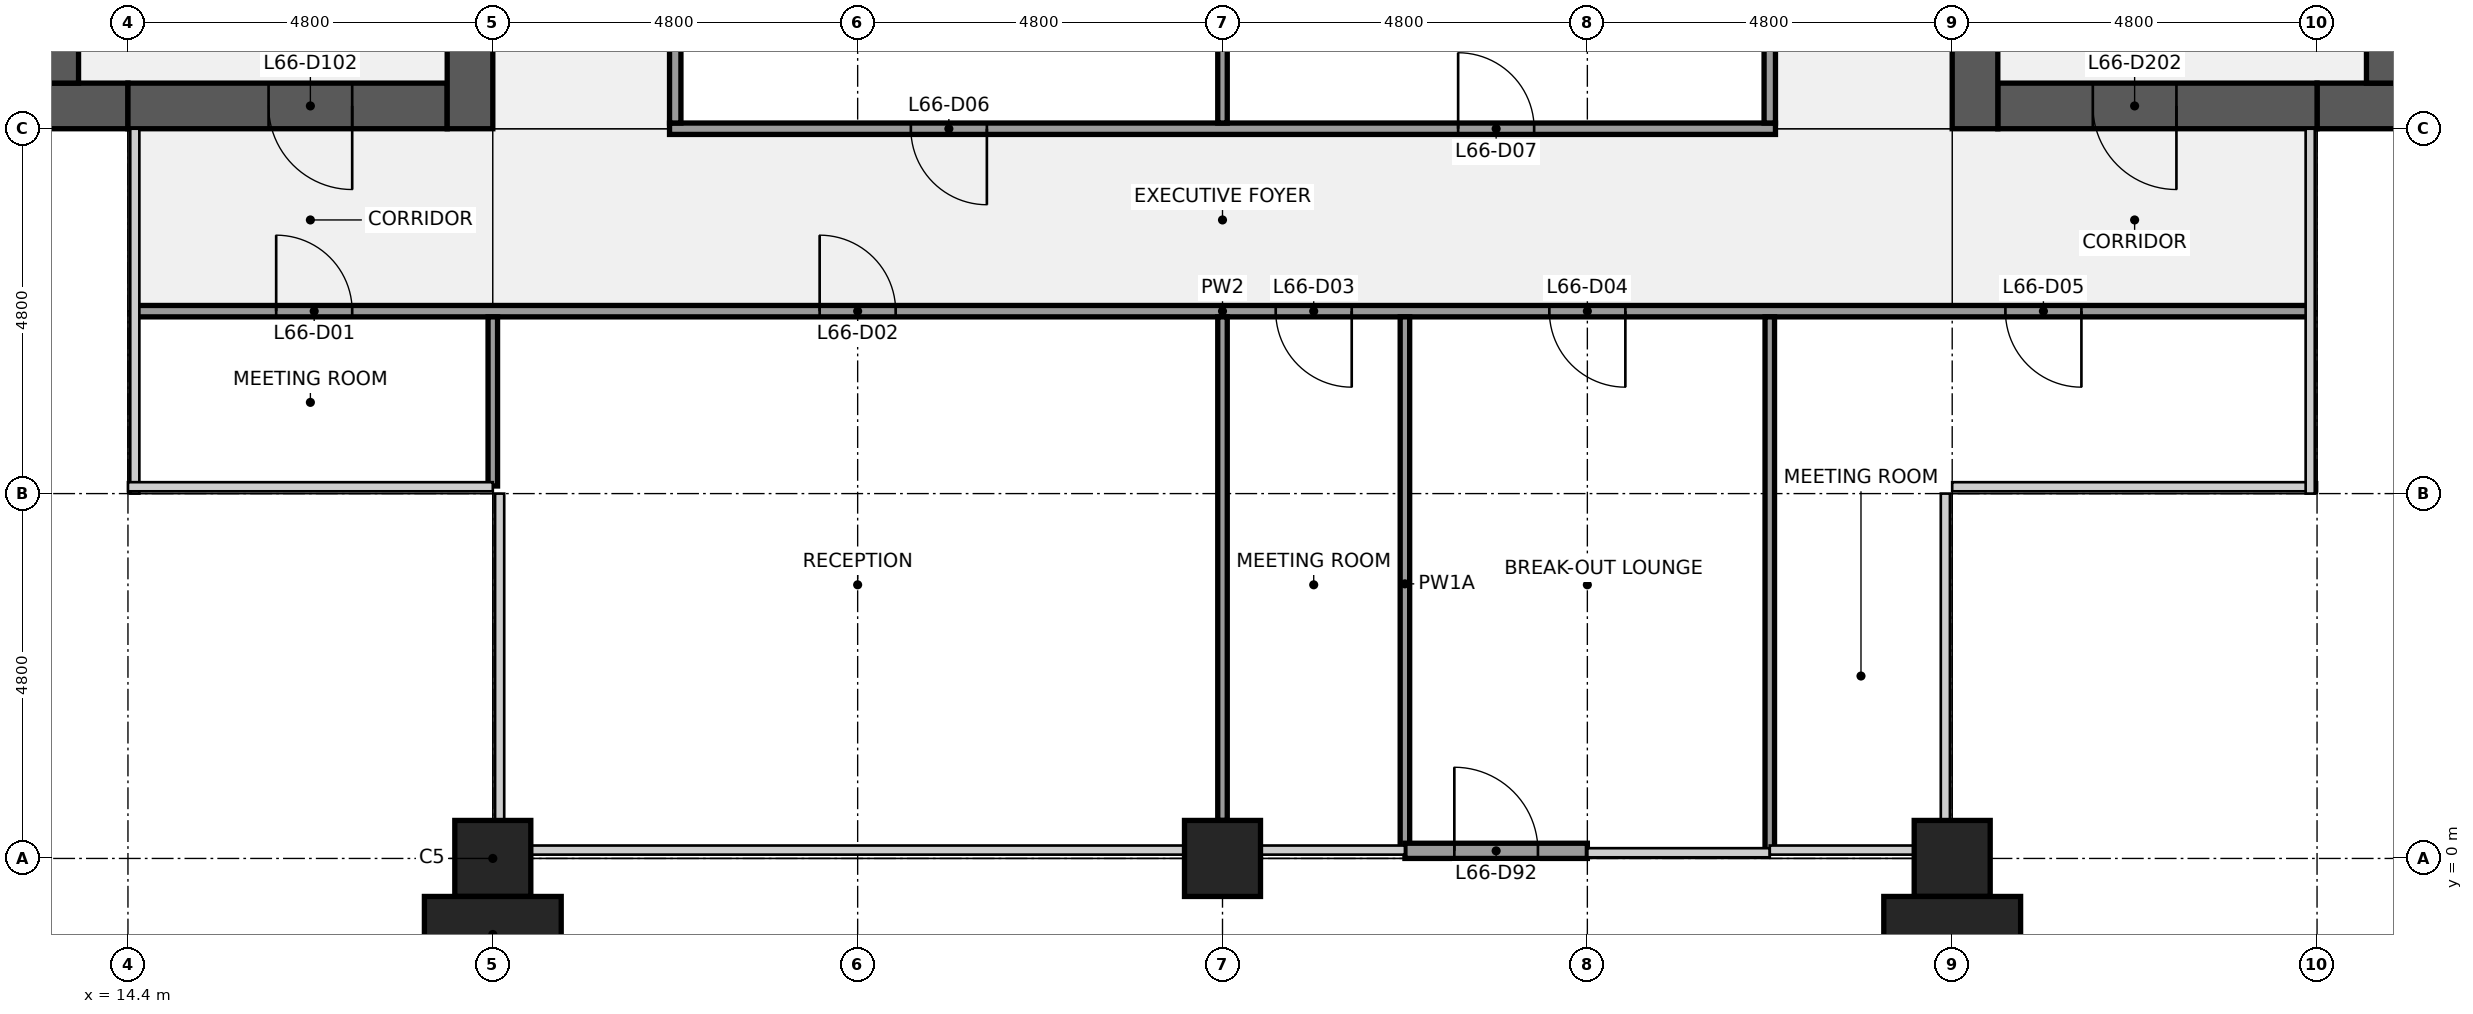
"""IFC4 building model, lengths in metres.
Left out: names, types, materials, properties, quantities, classifications, styles, units other than length and angle.
Written with IfcOpenShell. Run it as: python <this file> out.ifc"""

import sys

from ifc_helpers import new_model, si_unit, direction, frame, frame_2d, origin, origin_2d, place, context, subcontext, project, spatial, rectangle, extrude, element, fill, save


model = new_model("IFC4")
c1 = context("Model", 3, precision=1e-05, world=origin(), true_north=direction((0.0, 1.0)))
c2 = subcontext(c1, "Body", "Model", "MODEL_VIEW")
j1 = project(units=[si_unit("LENGTHUNIT", "METRE"), si_unit("PLANEANGLEUNIT", "RADIAN")], contexts=[c1])
p1 = place(None, origin())
s1 = spatial("IfcSite", under=j1, at=p1, CompositionType="ELEMENT")
p2 = place(p1, origin())
s2 = spatial("IfcBuilding", under=s1, at=p2, CompositionType="ELEMENT")
p3 = place(p2, frame((0.0, 0.0, 302.3)))
s3 = spatial("IfcBuildingStorey", under=s2, at=p3, CompositionType="ELEMENT", Elevation=302.3)
for number, where, z_axis, x_axis in (
    (1, (19.2, 0.0, 0.0), (0.0, 0.0, 1.0), (1.0, 0.0, 0.0)),
    (2, (28.8, 0.0, 0.0), (0.0, 0.0, 1.0), (1.0, 0.0, 0.0)),
    (3, (38.4, 0.0, 0.0), (0.0, 0.0, 1.0), (1.0, 0.0, 0.0)),
):
    element("IfcColumn", number, at=place(p3, frame(where, z_axis=z_axis, x_axis=x_axis)), inside=s3, PredefinedType="COLUMN", context=c2, shape_type="SweptSolid", body=[
        extrude(rectangle(XDim=1.0, YDim=1.0, at=origin_2d()), origin(), (0.0, 0.0, 1.0), 4.0),
    ])
p4 = place(p3, frame((14.4, 9.9, 0.0), z_axis=(0.0, 0.0, 1.0), x_axis=(-1.0, 0.0, 0.0)))
e4 = element("IfcWall", 4, at=p4, inside=s3, PredefinedType="SHEAR", context=c2, shape_type="SweptSolid", body=[
    extrude(rectangle(XDim=13.8, YDim=0.6, at=frame_2d((6.9, 0.0))), origin(), (0.0, 0.0, 1.0), 3.84),
])
p5 = place(p4, frame((6.3, 0.0, 0.9)))
e5 = element("IfcOpeningElement", 5, at=p5, cuts=e4, PredefinedType="OPENING", context=c2, shape_type="SweptSolid", body=[
    extrude(rectangle(XDim=1.8, YDim=1.5, at=frame_2d((0.9, 0.75))), frame((0.0, 0.31, 0.0), z_axis=(0.0, -1.0, 0.0), x_axis=(1.0, 0.0, 0.0)), (0.0, 0.0, 1.0), 0.62),
])
p6 = place(p4, frame((1.5, 0.0, 0.9)))
e6 = element("IfcOpeningElement", 6, at=p6, cuts=e4, PredefinedType="OPENING", context=c2, shape_type="SweptSolid", body=[
    extrude(rectangle(XDim=1.8, YDim=1.5, at=frame_2d((0.9, 0.75))), frame((0.0, 0.31, 0.0), z_axis=(0.0, -1.0, 0.0), x_axis=(1.0, 0.0, 0.0)), (0.0, 0.0, 1.0), 0.62),
])
p7 = place(p3, frame((18.6, 9.9, 0.0), z_axis=(0.0, 0.0, 1.0), x_axis=(-1.0, 0.0, 0.0)))
e7 = element("IfcWall", 7, at=p7, inside=s3, PredefinedType="SHEAR", context=c2, shape_type="SweptSolid", body=[
    extrude(rectangle(XDim=4.2, YDim=0.6, at=frame_2d((2.1, 0.0))), origin(), (0.0, 0.0, 1.0), 3.84),
])
p8 = place(p7, frame((1.25, 0.0, 0.0)))
e8 = element("IfcOpeningElement", 8, at=p8, cuts=e7, PredefinedType="OPENING", context=c2, shape_type="SweptSolid", body=[
    extrude(rectangle(XDim=1.1, YDim=2.1, at=frame_2d((0.55, 1.05))), frame((0.0, 0.31, 0.0), z_axis=(0.0, -1.0, 0.0), x_axis=(1.0, 0.0, 0.0)), (0.0, 0.0, 1.0), 0.62),
])
p9 = place(p3, frame((18.9, 38.4, 0.0), z_axis=(0.0, 0.0, 1.0), x_axis=(0.0, -1.0, 0.0)))
e9 = element("IfcWall", 9, at=p9, inside=s3, PredefinedType="SHEAR", context=c2, shape_type="SweptSolid", body=[
    extrude(rectangle(XDim=28.8, YDim=0.6, at=frame_2d((14.4, 0.0))), origin(), (0.0, 0.0, 1.0), 3.84),
])
p10 = place(p9, frame((18.3, 0.0, 0.0)))
e10 = element("IfcOpeningElement", 10, at=p10, cuts=e9, PredefinedType="OPENING", context=c2, shape_type="SweptSolid", body=[
    extrude(rectangle(XDim=1.8, YDim=2.1, at=frame_2d((0.9, 1.05))), frame((0.0, 0.31, 0.0), z_axis=(0.0, -1.0, 0.0), x_axis=(1.0, 0.0, 0.0)), (0.0, 0.0, 1.0), 0.62),
])
p11 = place(p9, frame((8.7, 0.0, 0.0)))
e11 = element("IfcOpeningElement", 11, at=p11, cuts=e9, PredefinedType="OPENING", context=c2, shape_type="SweptSolid", body=[
    extrude(rectangle(XDim=1.8, YDim=2.1, at=frame_2d((0.9, 1.05))), frame((0.0, 0.31, 0.0), z_axis=(0.0, -1.0, 0.0), x_axis=(1.0, 0.0, 0.0)), (0.0, 0.0, 1.0), 0.62),
])
p12 = place(p3, frame((6.25, 10.5, 0.0), z_axis=(0.0, 0.0, 1.0), x_axis=(1.0, 0.0, 0.0)))
e12 = element("IfcWall", 12, at=p12, inside=s3, PredefinedType="SHEAR", context=c2, shape_type="SweptSolid", body=[
    extrude(rectangle(XDim=7.5, YDim=0.6, at=frame_2d((3.75, 0.0))), origin(), (0.0, 0.0, 1.0), 3.84),
])
p13 = place(p3, frame((57.0, 9.9, 0.0), z_axis=(0.0, 0.0, 1.0), x_axis=(-1.0, 0.0, 0.0)))
e13 = element("IfcWall", 13, at=p13, inside=s3, PredefinedType="SHEAR", context=c2, shape_type="SweptSolid", body=[
    extrude(rectangle(XDim=13.8, YDim=0.6, at=frame_2d((6.9, 0.0))), origin(), (0.0, 0.0, 1.0), 3.84),
])
p14 = place(p13, frame((5.7, 0.0, 0.9)))
e14 = element("IfcOpeningElement", 14, at=p14, cuts=e13, PredefinedType="OPENING", context=c2, shape_type="SweptSolid", body=[
    extrude(rectangle(XDim=1.8, YDim=1.5, at=frame_2d((0.9, 0.75))), frame((0.0, 0.31, 0.0), z_axis=(0.0, -1.0, 0.0), x_axis=(1.0, 0.0, 0.0)), (0.0, 0.0, 1.0), 0.62),
])
p15 = place(p13, frame((10.5, 0.0, 0.9)))
e15 = element("IfcOpeningElement", 15, at=p15, cuts=e13, PredefinedType="OPENING", context=c2, shape_type="SweptSolid", body=[
    extrude(rectangle(XDim=1.8, YDim=1.5, at=frame_2d((0.9, 0.75))), frame((0.0, 0.31, 0.0), z_axis=(0.0, -1.0, 0.0), x_axis=(1.0, 0.0, 0.0)), (0.0, 0.0, 1.0), 0.62),
])
p16 = place(p3, frame((43.2, 9.9, 0.0), z_axis=(0.0, 0.0, 1.0), x_axis=(-1.0, 0.0, 0.0)))
e16 = element("IfcWall", 16, at=p16, inside=s3, PredefinedType="SHEAR", context=c2, shape_type="SweptSolid", body=[
    extrude(rectangle(XDim=4.2, YDim=0.6, at=frame_2d((2.1, 0.0))), origin(), (0.0, 0.0, 1.0), 3.84),
])
p17 = place(p16, frame((1.85, 0.0, 0.0)))
e17 = element("IfcOpeningElement", 17, at=p17, cuts=e16, PredefinedType="OPENING", context=c2, shape_type="SweptSolid", body=[
    extrude(rectangle(XDim=1.1, YDim=2.1, at=frame_2d((0.55, 1.05))), frame((0.0, 0.31, 0.0), z_axis=(0.0, -1.0, 0.0), x_axis=(1.0, 0.0, 0.0)), (0.0, 0.0, 1.0), 0.62),
])
p18 = place(p3, frame((38.7, 9.6, 0.0), z_axis=(0.0, 0.0, 1.0), x_axis=(0.0, 1.0, 0.0)))
e18 = element("IfcWall", 18, at=p18, inside=s3, PredefinedType="SHEAR", context=c2, shape_type="SweptSolid", body=[
    extrude(rectangle(XDim=28.8, YDim=0.6, at=frame_2d((14.4, 0.0))), origin(), (0.0, 0.0, 1.0), 3.84),
])
p19 = place(p18, frame((8.7, 0.0, 0.0)))
e19 = element("IfcOpeningElement", 19, at=p19, cuts=e18, PredefinedType="OPENING", context=c2, shape_type="SweptSolid", body=[
    extrude(rectangle(XDim=1.8, YDim=2.1, at=frame_2d((0.9, 1.05))), frame((0.0, 0.31, 0.0), z_axis=(0.0, -1.0, 0.0), x_axis=(1.0, 0.0, 0.0)), (0.0, 0.0, 1.0), 0.62),
])
p20 = place(p18, frame((18.3, 0.0, 0.0)))
e20 = element("IfcOpeningElement", 20, at=p20, cuts=e18, PredefinedType="OPENING", context=c2, shape_type="SweptSolid", body=[
    extrude(rectangle(XDim=1.8, YDim=2.1, at=frame_2d((0.9, 1.05))), frame((0.0, 0.31, 0.0), z_axis=(0.0, -1.0, 0.0), x_axis=(1.0, 0.0, 0.0)), (0.0, 0.0, 1.0), 0.62),
])
p21 = place(p3, frame((43.85, 10.5, 0.0), z_axis=(0.0, 0.0, 1.0), x_axis=(1.0, 0.0, 0.0)))
e21 = element("IfcWall", 21, at=p21, inside=s3, PredefinedType="SHEAR", context=c2, shape_type="SweptSolid", body=[
    extrude(rectangle(XDim=7.5, YDim=0.6, at=frame_2d((3.75, 0.0))), origin(), (0.0, 0.0, 1.0), 3.84),
])
p22 = place(p3, frame((14.5, 7.2, 0.0), z_axis=(0.0, 0.0, 1.0), x_axis=(1.0, 0.0, 0.0)))
e22 = element("IfcWall", 22, at=p22, inside=s3, PredefinedType="PARTITIONING", context=c2, shape_type="SweptSolid", body=[
    extrude(rectangle(XDim=28.6, YDim=0.15, at=frame_2d((14.3, 0.0))), origin(), (0.0, 0.0, 1.0), 2.87),
])
p23 = place(p22, frame((1.85, 0.0, 0.0)))
e23 = element("IfcOpeningElement", 23, at=p23, cuts=e22, PredefinedType="OPENING", context=c2, shape_type="SweptSolid", body=[
    extrude(rectangle(XDim=1.0, YDim=2.1, at=frame_2d((0.5, 1.05))), frame((0.0, 0.085, 0.0), z_axis=(0.0, -1.0, 0.0), x_axis=(1.0, 0.0, 0.0)), (0.0, 0.0, 1.0), 0.17),
])
p24 = place(p22, frame((9.0, 0.0, 0.0)))
e24 = element("IfcOpeningElement", 24, at=p24, cuts=e22, PredefinedType="OPENING", context=c2, shape_type="SweptSolid", body=[
    extrude(rectangle(XDim=1.0, YDim=2.1, at=frame_2d((0.5, 1.05))), frame((0.0, 0.085, 0.0), z_axis=(0.0, -1.0, 0.0), x_axis=(1.0, 0.0, 0.0)), (0.0, 0.0, 1.0), 0.17),
])
p25 = place(p22, frame((15.0, 0.0, 0.0)))
e25 = element("IfcOpeningElement", 25, at=p25, cuts=e22, PredefinedType="OPENING", context=c2, shape_type="SweptSolid", body=[
    extrude(rectangle(XDim=1.0, YDim=2.1, at=frame_2d((0.5, 1.05))), frame((0.0, 0.085, 0.0), z_axis=(0.0, -1.0, 0.0), x_axis=(1.0, 0.0, 0.0)), (0.0, 0.0, 1.0), 0.17),
])
p26 = place(p22, frame((18.6, 0.0, 0.0)))
e26 = element("IfcOpeningElement", 26, at=p26, cuts=e22, PredefinedType="OPENING", context=c2, shape_type="SweptSolid", body=[
    extrude(rectangle(XDim=1.0, YDim=2.1, at=frame_2d((0.5, 1.05))), frame((0.0, 0.085, 0.0), z_axis=(0.0, -1.0, 0.0), x_axis=(1.0, 0.0, 0.0)), (0.0, 0.0, 1.0), 0.17),
])
p27 = place(p22, frame((24.6, 0.0, 0.0)))
e27 = element("IfcOpeningElement", 27, at=p27, cuts=e22, PredefinedType="OPENING", context=c2, shape_type="SweptSolid", body=[
    extrude(rectangle(XDim=1.0, YDim=2.1, at=frame_2d((0.5, 1.05))), frame((0.0, 0.085, 0.0), z_axis=(0.0, -1.0, 0.0), x_axis=(1.0, 0.0, 0.0)), (0.0, 0.0, 1.0), 0.17),
])
p28 = place(p3, frame((21.525, 9.6, 0.0), z_axis=(0.0, 0.0, 1.0), x_axis=(1.0, 0.0, 0.0)))
e28 = element("IfcWall", 28, at=p28, inside=s3, PredefinedType="PARTITIONING", context=c2, shape_type="SweptSolid", body=[
    extrude(rectangle(XDim=14.55, YDim=0.15, at=frame_2d((7.275, 0.0))), origin(), (0.0, 0.0, 1.0), 2.87),
])
p29 = place(p28, frame((3.175, 0.0, 0.0)))
e29 = element("IfcOpeningElement", 29, at=p29, cuts=e28, PredefinedType="OPENING", context=c2, shape_type="SweptSolid", body=[
    extrude(rectangle(XDim=1.0, YDim=2.1, at=frame_2d((0.5, 1.05))), frame((0.0, 0.085, 0.0), z_axis=(0.0, -1.0, 0.0), x_axis=(1.0, 0.0, 0.0)), (0.0, 0.0, 1.0), 0.17),
])
p30 = place(p28, frame((10.375, 0.0, 0.0)))
e30 = element("IfcOpeningElement", 30, at=p30, cuts=e28, PredefinedType="OPENING", context=c2, shape_type="SweptSolid", body=[
    extrude(rectangle(XDim=1.0, YDim=2.1, at=frame_2d((0.5, 1.05))), frame((0.0, 0.085, 0.0), z_axis=(0.0, -1.0, 0.0), x_axis=(1.0, 0.0, 0.0)), (0.0, 0.0, 1.0), 0.17),
])
p31 = place(p3, frame((19.2, 4.9, 0.0), z_axis=(0.0, 0.0, 1.0), x_axis=(0.0, 1.0, 0.0)))
e31 = element("IfcWall", 31, at=p31, inside=s3, PredefinedType="PARTITIONING", context=c2, shape_type="SweptSolid", body=[
    extrude(rectangle(XDim=2.225, YDim=0.125, at=frame_2d((1.113, 0.0))), origin(), (0.0, 0.0, 1.0), 2.87),
])
p32 = place(p3, frame((21.6, 9.675, 0.0), z_axis=(0.0, 0.0, 1.0), x_axis=(0.0, 1.0, 0.0)))
e32 = element("IfcWall", 32, at=p32, inside=s3, PredefinedType="PARTITIONING", context=c2, shape_type="SweptSolid", body=[
    extrude(rectangle(XDim=4.65, YDim=0.15, at=frame_2d((2.325, 0.0))), origin(), (0.0, 0.0, 1.0), 2.87),
])
p33 = place(p3, frame((28.8, 0.5, 0.0), z_axis=(0.0, 0.0, 1.0), x_axis=(0.0, 1.0, 0.0)))
e33 = element("IfcWall", 33, at=p33, inside=s3, PredefinedType="PARTITIONING", context=c2, shape_type="SweptSolid", body=[
    extrude(rectangle(XDim=6.625, YDim=0.125, at=frame_2d((3.312, 0.0))), origin(), (0.0, 0.0, 1.0), 2.87),
])
p34 = place(p3, frame((28.8, 9.675, 0.0), z_axis=(0.0, 0.0, 1.0), x_axis=(0.0, 1.0, 0.0)))
e34 = element("IfcWall", 34, at=p34, inside=s3, PredefinedType="PARTITIONING", context=c2, shape_type="SweptSolid", body=[
    extrude(rectangle(XDim=4.662, YDim=0.125, at=frame_2d((2.331, 0.0))), origin(), (0.0, 0.0, 1.0), 2.87),
])
for number, where, z_axis, x_axis in (
    (35, (31.2, 0.1, 0.0), (0.0, 0.0, 1.0), (0.0, 1.0, 0.0)),
    (36, (36.0, 0.1, 0.0), (0.0, 0.0, 1.0), (0.0, 1.0, 0.0)),
):
    element("IfcWall", number, at=place(p3, frame(where, z_axis=z_axis, x_axis=x_axis)), inside=s3, PredefinedType="PARTITIONING", context=c2, shape_type="SweptSolid", body=[
        extrude(rectangle(XDim=7.025, YDim=0.125, at=frame_2d((3.512, 0.0))), origin(), (0.0, 0.0, 1.0), 2.87),
    ])
p35 = place(p3, frame((36.0, 9.675, 0.0), z_axis=(0.0, 0.0, 1.0), x_axis=(0.0, 1.0, 0.0)))
e37 = element("IfcWall", 37, at=p35, inside=s3, PredefinedType="PARTITIONING", context=c2, shape_type="SweptSolid", body=[
    extrude(rectangle(XDim=4.65, YDim=0.15, at=frame_2d((2.325, 0.0))), origin(), (0.0, 0.0, 1.0), 2.87),
])
p36 = place(p3, frame((31.2, 0.1, 0.0), z_axis=(0.0, 0.0, 1.0), x_axis=(1.0, 0.0, 0.0)))
e38 = element("IfcWall", 38, at=p36, inside=s3, PredefinedType="SOLIDWALL", context=c2, shape_type="SweptSolid", body=[
    extrude(rectangle(XDim=2.4, YDim=0.2, at=frame_2d((1.2, 0.0))), origin(), (0.0, 0.0, 1.0), 3.314),
])
p37 = place(p36, frame((0.65, 0.0, 0.0)))
e39 = element("IfcOpeningElement", 39, at=p37, cuts=e38, PredefinedType="OPENING", context=c2, shape_type="SweptSolid", body=[
    extrude(rectangle(XDim=1.1, YDim=2.1, at=frame_2d((0.55, 1.05))), frame((0.0, 0.11, 0.0), z_axis=(0.0, -1.0, 0.0), x_axis=(1.0, 0.0, 0.0)), (0.0, 0.0, 1.0), 0.22),
])
for number, where, z_axis, x_axis in (
    (40, (19.2, -1.0, 0.0), (0.0, 0.0, 1.0), (1.0, 0.0, 0.0)),
    (41, (38.4, -1.0, 0.0), (0.0, 0.0, 1.0), (1.0, 0.0, 0.0)),
):
    element("IfcColumn", number, at=place(p3, frame(where, z_axis=z_axis, x_axis=x_axis)), inside=s3, PredefinedType="PILASTER", context=c2, shape_type="SweptSolid", body=[
        extrude(rectangle(XDim=1.8, YDim=1.0, at=origin_2d()), origin(), (0.0, 0.0, 1.0), 4.0),
    ])
p38 = place(p8, origin())
e42 = element("IfcDoor", 42, at=p38, inside=s3, OperationType="SINGLE_SWING_LEFT", PredefinedType="DOOR", context=c2, shape_type="SweptSolid", body=[
    extrude(rectangle(XDim=1.1, YDim=2.1, at=frame_2d((0.55, 1.05))), frame((0.0, 0.025, 0.0), z_axis=(0.0, -1.0, 0.0), x_axis=(1.0, 0.0, 0.0)), (0.0, 0.0, 1.0), 0.05),
])
fill(e8, e42)
p39 = place(p17, origin())
e43 = element("IfcDoor", 43, at=p39, inside=s3, OperationType="SINGLE_SWING_LEFT", PredefinedType="DOOR", context=c2, shape_type="SweptSolid", body=[
    extrude(rectangle(XDim=1.1, YDim=2.1, at=frame_2d((0.55, 1.05))), frame((0.0, 0.025, 0.0), z_axis=(0.0, -1.0, 0.0), x_axis=(1.0, 0.0, 0.0)), (0.0, 0.0, 1.0), 0.05),
])
fill(e17, e43)
p40 = place(p23, origin())
e44 = element("IfcDoor", 44, at=p40, inside=s3, OperationType="SINGLE_SWING_LEFT", PredefinedType="DOOR", context=c2, shape_type="SweptSolid", body=[
    extrude(rectangle(XDim=1.0, YDim=2.1, at=frame_2d((0.5, 1.05))), frame((0.0, 0.025, 0.0), z_axis=(0.0, -1.0, 0.0), x_axis=(1.0, 0.0, 0.0)), (0.0, 0.0, 1.0), 0.05),
])
fill(e23, e44)
p41 = place(p24, origin())
e45 = element("IfcDoor", 45, at=p41, inside=s3, OperationType="SINGLE_SWING_LEFT", PredefinedType="DOOR", context=c2, shape_type="SweptSolid", body=[
    extrude(rectangle(XDim=1.0, YDim=2.1, at=frame_2d((0.5, 1.05))), frame((0.0, 0.025, 0.0), z_axis=(0.0, -1.0, 0.0), x_axis=(1.0, 0.0, 0.0)), (0.0, 0.0, 1.0), 0.05),
])
fill(e24, e45)
p42 = place(p25, origin())
e46 = element("IfcDoor", 46, at=p42, inside=s3, OperationType="SINGLE_SWING_RIGHT", PredefinedType="DOOR", context=c2, shape_type="SweptSolid", body=[
    extrude(rectangle(XDim=1.0, YDim=2.1, at=frame_2d((0.5, 1.05))), frame((0.0, 0.025, 0.0), z_axis=(0.0, -1.0, 0.0), x_axis=(1.0, 0.0, 0.0)), (0.0, 0.0, 1.0), 0.05),
])
fill(e25, e46)
p43 = place(p26, origin())
e47 = element("IfcDoor", 47, at=p43, inside=s3, OperationType="SINGLE_SWING_RIGHT", PredefinedType="DOOR", context=c2, shape_type="SweptSolid", body=[
    extrude(rectangle(XDim=1.0, YDim=2.1, at=frame_2d((0.5, 1.05))), frame((0.0, 0.025, 0.0), z_axis=(0.0, -1.0, 0.0), x_axis=(1.0, 0.0, 0.0)), (0.0, 0.0, 1.0), 0.05),
])
fill(e26, e47)
p44 = place(p27, origin())
e48 = element("IfcDoor", 48, at=p44, inside=s3, OperationType="SINGLE_SWING_RIGHT", PredefinedType="DOOR", context=c2, shape_type="SweptSolid", body=[
    extrude(rectangle(XDim=1.0, YDim=2.1, at=frame_2d((0.5, 1.05))), frame((0.0, 0.025, 0.0), z_axis=(0.0, -1.0, 0.0), x_axis=(1.0, 0.0, 0.0)), (0.0, 0.0, 1.0), 0.05),
])
fill(e27, e48)
p45 = place(p29, origin())
e49 = element("IfcDoor", 49, at=p45, inside=s3, OperationType="SINGLE_SWING_RIGHT", PredefinedType="DOOR", context=c2, shape_type="SweptSolid", body=[
    extrude(rectangle(XDim=1.0, YDim=2.1, at=frame_2d((0.5, 1.05))), frame((0.0, 0.025, 0.0), z_axis=(0.0, -1.0, 0.0), x_axis=(1.0, 0.0, 0.0)), (0.0, 0.0, 1.0), 0.05),
])
fill(e29, e49)
p46 = place(p30, origin())
e50 = element("IfcDoor", 50, at=p46, inside=s3, OperationType="SINGLE_SWING_LEFT", PredefinedType="DOOR", context=c2, shape_type="SweptSolid", body=[
    extrude(rectangle(XDim=1.0, YDim=2.1, at=frame_2d((0.5, 1.05))), frame((0.0, 0.025, 0.0), z_axis=(0.0, -1.0, 0.0), x_axis=(1.0, 0.0, 0.0)), (0.0, 0.0, 1.0), 0.05),
])
fill(e30, e50)
p47 = place(p37, origin())
e51 = element("IfcDoor", 51, at=p47, inside=s3, OperationType="SINGLE_SWING_LEFT", PredefinedType="DOOR", context=c2, shape_type="SweptSolid", body=[
    extrude(rectangle(XDim=1.1, YDim=2.1, at=frame_2d((0.55, 1.05))), frame((0.0, 0.025, 0.0), z_axis=(0.0, -1.0, 0.0), x_axis=(1.0, 0.0, 0.0)), (0.0, 0.0, 1.0), 0.05),
])
fill(e39, e51)
save(model, sys.argv[1])
